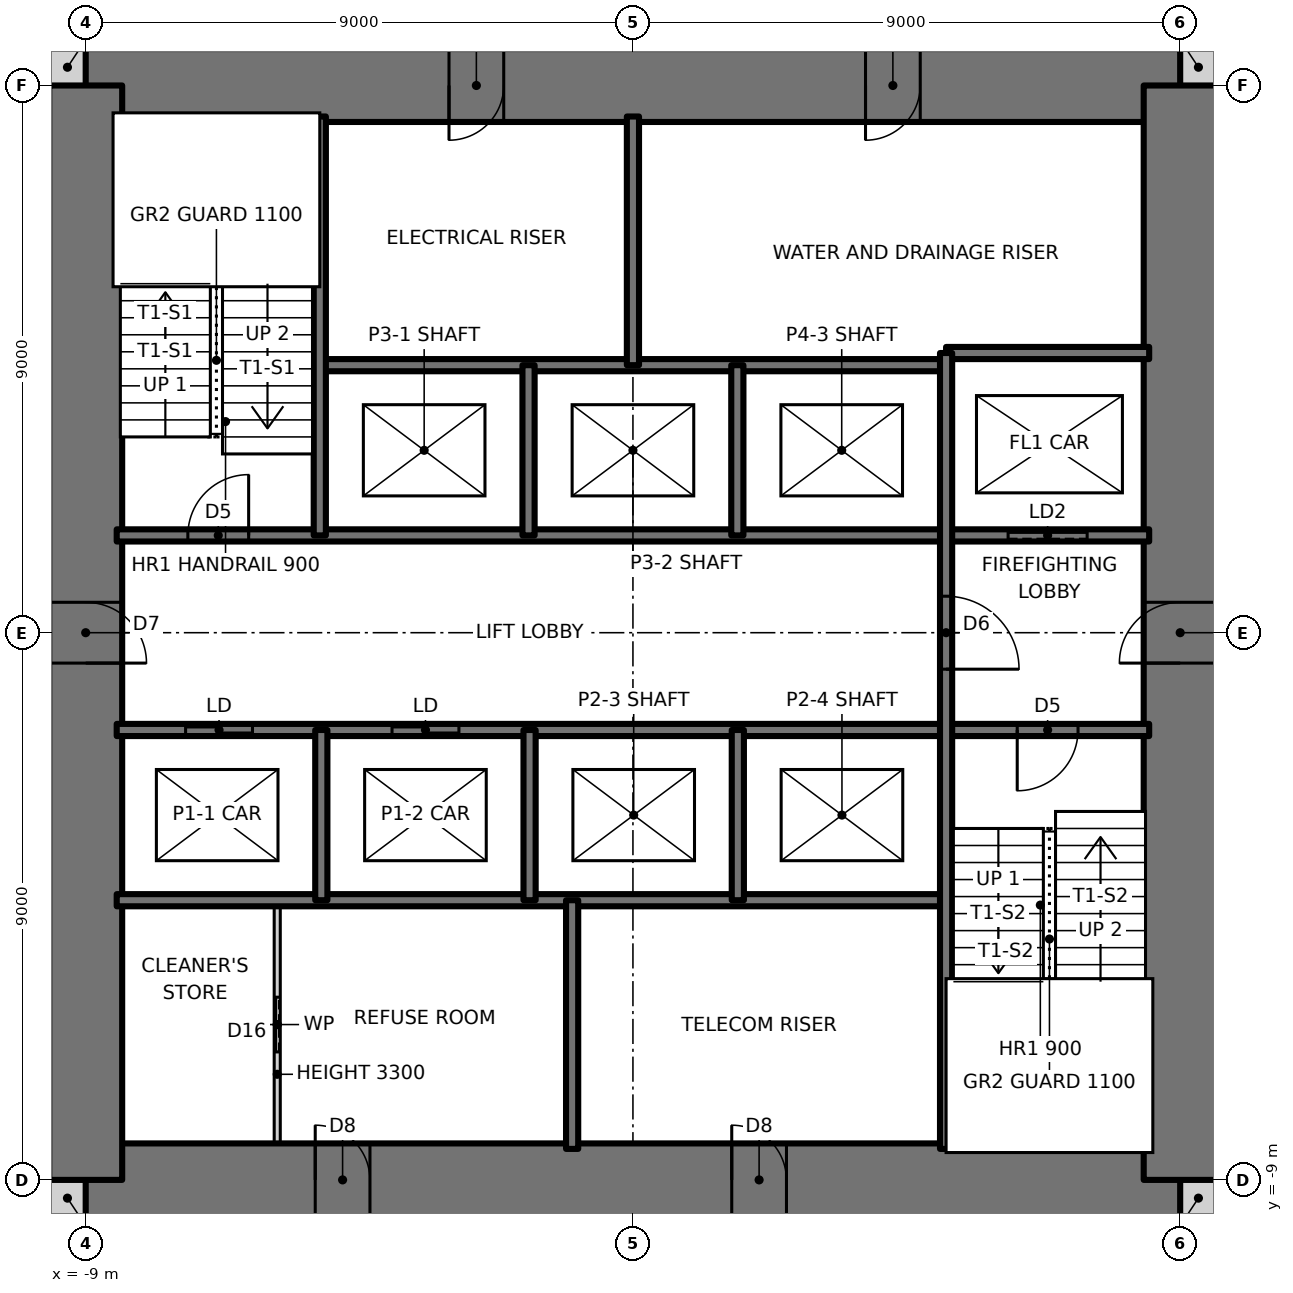
"""IFC4 building model, lengths in metres.
Left out: names, types, materials, properties, quantities, classifications, styles, units other than length and angle.
Written with IfcOpenShell. Run it as: python <this file> out.ifc"""

import sys

from ifc_helpers import new_model, si_unit, direction, frame, frame_2d, origin, place, context, subcontext, project, spatial, rectangle, extrude, element, fill, save


model = new_model("IFC4")
c1 = context("Model", 3, precision=1e-05, world=origin(), true_north=direction((0.0, 1.0)))
c2 = subcontext(c1, "Body", "Model", "MODEL_VIEW")
j1 = project(units=[si_unit("LENGTHUNIT", "METRE"), si_unit("PLANEANGLEUNIT", "RADIAN")], contexts=[c1])
p1 = place(None, origin())
s1 = spatial("IfcSite", under=j1, at=p1, CompositionType="ELEMENT")
p2 = place(p1, origin())
s2 = spatial("IfcBuilding", under=s1, at=p2, CompositionType="ELEMENT")
p3 = place(p2, frame((0.0, 0.0, 32.5)))
s3 = spatial("IfcBuildingStorey", under=s2, at=p3, CompositionType="ELEMENT", Elevation=32.5)
for number, where, z_axis, x_axis in (
    (1, (-9.6, -9.3, 0.0), (0.0, 0.0, 1.0), (1.0, 0.0, 0.0)),
    (2, (9.0, -9.3, 0.0), (0.0, 0.0, 1.0), (1.0, 0.0, 0.0)),
    (3, (9.0, 9.3, 0.0), (0.0, 0.0, 1.0), (1.0, 0.0, 0.0)),
    (4, (-9.6, 9.3, 0.0), (0.0, 0.0, 1.0), (1.0, 0.0, 0.0)),
):
    element("IfcWall", number, at=place(p3, frame(where, z_axis=z_axis, x_axis=x_axis)), inside=s3, PredefinedType="SOLIDWALL", context=c2, shape_type="SweptSolid", body=[
        extrude(rectangle(XDim=0.6, YDim=0.6, at=frame_2d((0.3, 0.0))), origin(), (0.0, 0.0, 1.0), 3.5),
    ])
p4 = place(p3, frame((-9.0, -9.0, 0.0), z_axis=(0.0, 0.0, 1.0), x_axis=(1.0, 0.0, 0.0)))
e5 = element("IfcWall", 5, at=p4, inside=s3, PredefinedType="SHEAR", context=c2, shape_type="SweptSolid", body=[
    extrude(rectangle(XDim=18.0, YDim=1.2, at=frame_2d((9.0, 0.0))), origin(), (0.0, 0.0, 1.0), 3.5),
])
p5 = place(p4, frame((3.775, 0.0, 0.0)))
e6 = element("IfcOpeningElement", 6, at=p5, cuts=e5, PredefinedType="OPENING", context=c2, shape_type="SweptSolid", body=[
    extrude(rectangle(XDim=0.9, YDim=2.1, at=frame_2d((0.45, 1.05))), frame((0.0, 0.61, 0.0), z_axis=(0.0, -1.0, 0.0), x_axis=(1.0, 0.0, 0.0)), (0.0, 0.0, 1.0), 1.22),
])
p6 = place(p4, frame((10.625, 0.0, 0.0)))
e7 = element("IfcOpeningElement", 7, at=p6, cuts=e5, PredefinedType="OPENING", context=c2, shape_type="SweptSolid", body=[
    extrude(rectangle(XDim=0.9, YDim=2.1, at=frame_2d((0.45, 1.05))), frame((0.0, 0.61, 0.0), z_axis=(0.0, -1.0, 0.0), x_axis=(1.0, 0.0, 0.0)), (0.0, 0.0, 1.0), 1.22),
])
p7 = place(p3, frame((9.0, 9.0, 0.0), z_axis=(0.0, 0.0, 1.0), x_axis=(-1.0, 0.0, 0.0)))
e8 = element("IfcWall", 8, at=p7, inside=s3, PredefinedType="SHEAR", context=c2, shape_type="SweptSolid", body=[
    extrude(rectangle(XDim=18.0, YDim=1.2, at=frame_2d((9.0, 0.0))), origin(), (0.0, 0.0, 1.0), 3.5),
])
p8 = place(p7, frame((11.125, 0.0, 0.0)))
e9 = element("IfcOpeningElement", 9, at=p8, cuts=e8, PredefinedType="OPENING", context=c2, shape_type="SweptSolid", body=[
    extrude(rectangle(XDim=0.9, YDim=2.1, at=frame_2d((0.45, 1.05))), frame((0.0, 0.61, 0.0), z_axis=(0.0, -1.0, 0.0), x_axis=(1.0, 0.0, 0.0)), (0.0, 0.0, 1.0), 1.22),
])
p9 = place(p7, frame((4.275, 0.0, 0.0)))
e10 = element("IfcOpeningElement", 10, at=p9, cuts=e8, PredefinedType="OPENING", context=c2, shape_type="SweptSolid", body=[
    extrude(rectangle(XDim=0.9, YDim=2.1, at=frame_2d((0.45, 1.05))), frame((0.0, 0.61, 0.0), z_axis=(0.0, -1.0, 0.0), x_axis=(1.0, 0.0, 0.0)), (0.0, 0.0, 1.0), 1.22),
])
p10 = place(p3, frame((9.0, -9.0, 0.0), z_axis=(0.0, 0.0, 1.0), x_axis=(0.0, 1.0, 0.0)))
e11 = element("IfcWall", 11, at=p10, inside=s3, PredefinedType="SHEAR", context=c2, shape_type="SweptSolid", body=[
    extrude(rectangle(XDim=18.0, YDim=1.2, at=frame_2d((9.0, 0.0))), origin(), (0.0, 0.0, 1.0), 3.5),
])
p11 = place(p10, frame((8.5, 0.0, 0.0)))
e12 = element("IfcOpeningElement", 12, at=p11, cuts=e11, PredefinedType="OPENING", context=c2, shape_type="SweptSolid", body=[
    extrude(rectangle(XDim=1.0, YDim=2.1, at=frame_2d((0.5, 1.05))), frame((0.0, 0.61, 0.0), z_axis=(0.0, -1.0, 0.0), x_axis=(1.0, 0.0, 0.0)), (0.0, 0.0, 1.0), 1.22),
])
p12 = place(p3, frame((-9.0, 9.0, 0.0), z_axis=(0.0, 0.0, 1.0), x_axis=(0.0, -1.0, 0.0)))
e13 = element("IfcWall", 13, at=p12, inside=s3, PredefinedType="SHEAR", context=c2, shape_type="SweptSolid", body=[
    extrude(rectangle(XDim=18.0, YDim=1.2, at=frame_2d((9.0, 0.0))), origin(), (0.0, 0.0, 1.0), 3.5),
])
p13 = place(p12, frame((8.5, 0.0, 0.0)))
e14 = element("IfcOpeningElement", 14, at=p13, cuts=e13, PredefinedType="OPENING", context=c2, shape_type="SweptSolid", body=[
    extrude(rectangle(XDim=1.0, YDim=2.1, at=frame_2d((0.5, 1.05))), frame((0.0, 0.61, 0.0), z_axis=(0.0, -1.0, 0.0), x_axis=(1.0, 0.0, 0.0)), (0.0, 0.0, 1.0), 1.22),
])
p14 = place(p3, frame((-8.49, -4.4, 0.0), z_axis=(0.0, 0.0, 1.0), x_axis=(1.0, 0.0, 0.0)))
e15 = element("IfcWall", 15, at=p14, inside=s3, PredefinedType="SOLIDWALL", context=c2, shape_type="SweptSolid", body=[
    extrude(rectangle(XDim=13.64, YDim=0.2, at=frame_2d((6.82, 0.0))), origin(), (0.0, 0.0, 1.0), 3.5),
])
p15 = place(p3, frame((-8.49, -1.6, 0.0), z_axis=(0.0, 0.0, 1.0), x_axis=(1.0, 0.0, 0.0)))
e16 = element("IfcWall", 16, at=p15, inside=s3, PredefinedType="SOLIDWALL", context=c2, shape_type="SweptSolid", body=[
    extrude(rectangle(XDim=16.98, YDim=0.2, at=frame_2d((8.49, 0.0))), origin(), (0.0, 0.0, 1.0), 3.5),
])
p16 = place(p15, frame((14.81, 0.0, 0.0)))
e17 = element("IfcOpeningElement", 17, at=p16, cuts=e16, PredefinedType="OPENING", context=c2, shape_type="SweptSolid", body=[
    extrude(rectangle(XDim=1.0, YDim=2.1, at=frame_2d((0.5, 1.05))), frame((0.0, 0.11, 0.0), z_axis=(0.0, -1.0, 0.0), x_axis=(1.0, 0.0, 0.0)), (0.0, 0.0, 1.0), 0.22),
])
p17 = place(p15, frame((1.133, 0.0, 0.0)))
e18 = element("IfcOpeningElement", 18, at=p17, cuts=e16, PredefinedType="OPENING", context=c2, shape_type="SweptSolid", body=[
    extrude(rectangle(XDim=1.1, YDim=2.1, at=frame_2d((0.55, 1.05))), frame((0.0, 0.11, 0.0), z_axis=(0.0, -1.0, 0.0), x_axis=(1.0, 0.0, 0.0)), (0.0, 0.0, 1.0), 0.22),
])
p18 = place(p15, frame((4.528, 0.0, 0.0)))
e19 = element("IfcOpeningElement", 19, at=p18, cuts=e16, PredefinedType="OPENING", context=c2, shape_type="SweptSolid", body=[
    extrude(rectangle(XDim=1.1, YDim=2.1, at=frame_2d((0.55, 1.05))), frame((0.0, 0.11, 0.0), z_axis=(0.0, -1.0, 0.0), x_axis=(1.0, 0.0, 0.0)), (0.0, 0.0, 1.0), 0.22),
])
p19 = place(p3, frame((-8.49, 1.6, 0.0), z_axis=(0.0, 0.0, 1.0), x_axis=(1.0, 0.0, 0.0)))
e20 = element("IfcWall", 20, at=p19, inside=s3, PredefinedType="SOLIDWALL", context=c2, shape_type="SweptSolid", body=[
    extrude(rectangle(XDim=16.98, YDim=0.2, at=frame_2d((8.49, 0.0))), origin(), (0.0, 0.0, 1.0), 3.5),
])
p20 = place(p19, frame((1.17, 0.0, 0.0)))
e21 = element("IfcOpeningElement", 21, at=p20, cuts=e20, PredefinedType="OPENING", context=c2, shape_type="SweptSolid", body=[
    extrude(rectangle(XDim=1.0, YDim=2.1, at=frame_2d((0.5, 1.05))), frame((0.0, 0.11, 0.0), z_axis=(0.0, -1.0, 0.0), x_axis=(1.0, 0.0, 0.0)), (0.0, 0.0, 1.0), 0.22),
])
p21 = place(p19, frame((14.66, 0.0, 0.0)))
e22 = element("IfcOpeningElement", 22, at=p21, cuts=e20, PredefinedType="OPENING", context=c2, shape_type="SweptSolid", body=[
    extrude(rectangle(XDim=1.3, YDim=2.1, at=frame_2d((0.65, 1.05))), frame((0.0, 0.11, 0.0), z_axis=(0.0, -1.0, 0.0), x_axis=(1.0, 0.0, 0.0)), (0.0, 0.0, 1.0), 0.22),
])
p22 = place(p3, frame((-5.15, 4.4, 0.0), z_axis=(0.0, 0.0, 1.0), x_axis=(1.0, 0.0, 0.0)))
e23 = element("IfcWall", 23, at=p22, inside=s3, PredefinedType="SOLIDWALL", context=c2, shape_type="SweptSolid", body=[
    extrude(rectangle(XDim=10.3, YDim=0.2, at=frame_2d((5.15, 0.0))), origin(), (0.0, 0.0, 1.0), 3.5),
])
p23 = place(p3, frame((5.15, 4.6, 0.0), z_axis=(0.0, 0.0, 1.0), x_axis=(1.0, 0.0, 0.0)))
e24 = element("IfcWall", 24, at=p23, inside=s3, PredefinedType="SOLIDWALL", context=c2, shape_type="SweptSolid", body=[
    extrude(rectangle(XDim=3.34, YDim=0.2, at=frame_2d((1.67, 0.0))), origin(), (0.0, 0.0, 1.0), 3.5),
])
p24 = place(p3, frame((5.15, -8.49, 0.0), z_axis=(0.0, 0.0, 1.0), x_axis=(0.0, 1.0, 0.0)))
e25 = element("IfcWall", 25, at=p24, inside=s3, PredefinedType="SOLIDWALL", context=c2, shape_type="SweptSolid", body=[
    extrude(rectangle(XDim=13.09, YDim=0.2, at=frame_2d((6.545, 0.0))), origin(), (0.0, 0.0, 1.0), 3.5),
])
p25 = place(p24, frame((7.89, 0.0, 0.0)))
e26 = element("IfcOpeningElement", 26, at=p25, cuts=e25, PredefinedType="OPENING", context=c2, shape_type="SweptSolid", body=[
    extrude(rectangle(XDim=1.2, YDim=2.1, at=frame_2d((0.6, 1.05))), frame((0.0, 0.11, 0.0), z_axis=(0.0, -1.0, 0.0), x_axis=(1.0, 0.0, 0.0)), (0.0, 0.0, 1.0), 0.22),
])
for number, where, z_axis, x_axis in (
    (27, (1.725, -4.4, 0.0), (0.0, 0.0, 1.0), (0.0, 1.0, 0.0)),
    (28, (1.717, 1.6, 0.0), (0.0, 0.0, 1.0), (0.0, 1.0, 0.0)),
):
    element("IfcWall", number, at=place(p3, frame(where, z_axis=z_axis, x_axis=x_axis)), inside=s3, PredefinedType="SOLIDWALL", context=c2, shape_type="SweptSolid", body=[
        extrude(rectangle(XDim=2.8, YDim=0.2, at=frame_2d((1.4, 0.0))), origin(), (0.0, 0.0, 1.0), 3.5),
    ])
for number, where, z_axis, x_axis in (
    (29, (0.0, 4.4, 0.0), (0.0, 0.0, 1.0), (0.0, 1.0, 0.0)),
    (30, (-1.0, -8.49, 0.0), (0.0, 0.0, 1.0), (0.0, 1.0, 0.0)),
):
    element("IfcWall", number, at=place(p3, frame(where, z_axis=z_axis, x_axis=x_axis)), inside=s3, PredefinedType="SOLIDWALL", context=c2, shape_type="SweptSolid", body=[
        extrude(rectangle(XDim=4.09, YDim=0.2, at=frame_2d((2.045, 0.0))), origin(), (0.0, 0.0, 1.0), 3.5),
    ])
for number, where, z_axis, x_axis in (
    (31, (-1.7, -4.4, 0.0), (0.0, 0.0, 1.0), (0.0, 1.0, 0.0)),
    (32, (-1.717, 1.6, 0.0), (0.0, 0.0, 1.0), (0.0, 1.0, 0.0)),
    (33, (-5.125, -4.4, 0.0), (0.0, 0.0, 1.0), (0.0, 1.0, 0.0)),
):
    element("IfcWall", number, at=place(p3, frame(where, z_axis=z_axis, x_axis=x_axis)), inside=s3, PredefinedType="SOLIDWALL", context=c2, shape_type="SweptSolid", body=[
        extrude(rectangle(XDim=2.8, YDim=0.2, at=frame_2d((1.4, 0.0))), origin(), (0.0, 0.0, 1.0), 3.5),
    ])
p26 = place(p3, frame((-5.15, 1.6, 0.0), z_axis=(0.0, 0.0, 1.0), x_axis=(0.0, 1.0, 0.0)))
e34 = element("IfcWall", 34, at=p26, inside=s3, PredefinedType="SOLIDWALL", context=c2, shape_type="SweptSolid", body=[
    extrude(rectangle(XDim=6.89, YDim=0.2, at=frame_2d((3.445, 0.0))), origin(), (0.0, 0.0, 1.0), 3.5),
])
p27 = place(p3, frame((-5.85, -8.49, 0.0), z_axis=(0.0, 0.0, 1.0), x_axis=(0.0, 1.0, 0.0)))
e35 = element("IfcWall", 35, at=p27, inside=s3, PredefinedType="PARTITIONING", context=c2, shape_type="SweptSolid", body=[
    extrude(rectangle(XDim=4.09, YDim=0.1, at=frame_2d((2.045, 0.0))), origin(), (0.0, 0.0, 1.0), 3.3),
])
p28 = place(p27, frame((1.595, 0.0, 0.0)))
e36 = element("IfcOpeningElement", 36, at=p28, cuts=e35, PredefinedType="OPENING", context=c2, shape_type="SweptSolid", body=[
    extrude(rectangle(XDim=0.9, YDim=2.1, at=frame_2d((0.45, 1.05))), frame((0.0, 0.06, 0.0), z_axis=(0.0, -1.0, 0.0), x_axis=(1.0, 0.0, 0.0)), (0.0, 0.0, 1.0), 0.12),
])
p29 = place(p20, origin())
e37 = element("IfcDoor", 37, at=p29, inside=s3, OperationType="SINGLE_SWING_RIGHT", PredefinedType="DOOR", context=c2, shape_type="SweptSolid", body=[
    extrude(rectangle(XDim=1.0, YDim=2.1, at=frame_2d((0.5, 1.05))), frame((0.0, 0.025, 0.0), z_axis=(0.0, -1.0, 0.0), x_axis=(1.0, 0.0, 0.0)), (0.0, 0.0, 1.0), 0.05),
])
fill(e21, e37)
p30 = place(p16, frame((1.0, 0.0, 0.0), z_axis=(0.0, 0.0, 1.0), x_axis=(-1.0, 0.0, 0.0)))
e38 = element("IfcDoor", 38, at=p30, inside=s3, OperationType="SINGLE_SWING_RIGHT", PredefinedType="DOOR", context=c2, shape_type="SweptSolid", body=[
    extrude(rectangle(XDim=1.0, YDim=2.1, at=frame_2d((0.5, 1.05))), frame((0.0, 0.025, 0.0), z_axis=(0.0, -1.0, 0.0), x_axis=(1.0, 0.0, 0.0)), (0.0, 0.0, 1.0), 0.05),
])
fill(e17, e38)
p31 = place(p25, frame((1.2, 0.0, 0.0), z_axis=(0.0, 0.0, 1.0), x_axis=(-1.0, 0.0, 0.0)))
e39 = element("IfcDoor", 39, at=p31, inside=s3, OperationType="SINGLE_SWING_RIGHT", PredefinedType="DOOR", context=c2, shape_type="SweptSolid", body=[
    extrude(rectangle(XDim=1.2, YDim=2.1, at=frame_2d((0.6, 1.05))), frame((0.0, 0.025, 0.0), z_axis=(0.0, -1.0, 0.0), x_axis=(1.0, 0.0, 0.0)), (0.0, 0.0, 1.0), 0.05),
])
fill(e26, e39)
p32 = place(p28, origin())
e40 = element("IfcDoor", 40, at=p32, inside=s3, OperationType="SLIDING_TO_LEFT", PredefinedType="DOOR", context=c2, shape_type="SweptSolid", body=[
    extrude(rectangle(XDim=0.9, YDim=2.1, at=frame_2d((0.45, 1.05))), frame((0.0, 0.025, 0.0), z_axis=(0.0, -1.0, 0.0), x_axis=(1.0, 0.0, 0.0)), (0.0, 0.0, 1.0), 0.05),
])
fill(e36, e40)
p33 = place(p13, origin())
e41 = element("IfcDoor", 41, at=p33, inside=s3, OperationType="SINGLE_SWING_RIGHT", PredefinedType="DOOR", context=c2, shape_type="SweptSolid", body=[
    extrude(rectangle(XDim=1.0, YDim=2.1, at=frame_2d((0.5, 1.05))), frame((0.0, 0.025, 0.0), z_axis=(0.0, -1.0, 0.0), x_axis=(1.0, 0.0, 0.0)), (0.0, 0.0, 1.0), 0.05),
])
fill(e14, e41)
p34 = place(p11, origin())
e42 = element("IfcDoor", 42, at=p34, inside=s3, OperationType="SINGLE_SWING_LEFT", PredefinedType="DOOR", context=c2, shape_type="SweptSolid", body=[
    extrude(rectangle(XDim=1.0, YDim=2.1, at=frame_2d((0.5, 1.05))), frame((0.0, 0.025, 0.0), z_axis=(0.0, -1.0, 0.0), x_axis=(1.0, 0.0, 0.0)), (0.0, 0.0, 1.0), 0.05),
])
fill(e12, e42)
p35 = place(p8, origin())
e43 = element("IfcDoor", 43, at=p35, inside=s3, OperationType="SINGLE_SWING_RIGHT", PredefinedType="DOOR", context=c2, shape_type="SweptSolid", body=[
    extrude(rectangle(XDim=0.9, YDim=2.1, at=frame_2d((0.45, 1.05))), frame((0.0, 0.025, 0.0), z_axis=(0.0, -1.0, 0.0), x_axis=(1.0, 0.0, 0.0)), (0.0, 0.0, 1.0), 0.05),
])
fill(e9, e43)
p36 = place(p9, origin())
e44 = element("IfcDoor", 44, at=p36, inside=s3, OperationType="SINGLE_SWING_RIGHT", PredefinedType="DOOR", context=c2, shape_type="SweptSolid", body=[
    extrude(rectangle(XDim=0.9, YDim=2.1, at=frame_2d((0.45, 1.05))), frame((0.0, 0.025, 0.0), z_axis=(0.0, -1.0, 0.0), x_axis=(1.0, 0.0, 0.0)), (0.0, 0.0, 1.0), 0.05),
])
fill(e10, e44)
p37 = place(p5, origin())
e45 = element("IfcDoor", 45, at=p37, inside=s3, OperationType="SINGLE_SWING_LEFT", PredefinedType="DOOR", context=c2, shape_type="SweptSolid", body=[
    extrude(rectangle(XDim=0.9, YDim=2.1, at=frame_2d((0.45, 1.05))), frame((0.0, 0.025, 0.0), z_axis=(0.0, -1.0, 0.0), x_axis=(1.0, 0.0, 0.0)), (0.0, 0.0, 1.0), 0.05),
])
fill(e6, e45)
p38 = place(p6, origin())
e46 = element("IfcDoor", 46, at=p38, inside=s3, OperationType="SINGLE_SWING_LEFT", PredefinedType="DOOR", context=c2, shape_type="SweptSolid", body=[
    extrude(rectangle(XDim=0.9, YDim=2.1, at=frame_2d((0.45, 1.05))), frame((0.0, 0.025, 0.0), z_axis=(0.0, -1.0, 0.0), x_axis=(1.0, 0.0, 0.0)), (0.0, 0.0, 1.0), 0.05),
])
fill(e7, e46)
p39 = place(p17, origin())
e47 = element("IfcDoor", 47, at=p39, inside=s3, OperationType="DOUBLE_DOOR_SLIDING", PredefinedType="DOOR", context=c2, shape_type="SweptSolid", body=[
    extrude(rectangle(XDim=1.1, YDim=2.1, at=frame_2d((0.55, 1.05))), frame((0.0, 0.025, 0.0), z_axis=(0.0, -1.0, 0.0), x_axis=(1.0, 0.0, 0.0)), (0.0, 0.0, 1.0), 0.05),
])
fill(e18, e47)
p40 = place(p18, origin())
e48 = element("IfcDoor", 48, at=p40, inside=s3, OperationType="DOUBLE_DOOR_SLIDING", PredefinedType="DOOR", context=c2, shape_type="SweptSolid", body=[
    extrude(rectangle(XDim=1.1, YDim=2.1, at=frame_2d((0.55, 1.05))), frame((0.0, 0.025, 0.0), z_axis=(0.0, -1.0, 0.0), x_axis=(1.0, 0.0, 0.0)), (0.0, 0.0, 1.0), 0.05),
])
fill(e19, e48)
p41 = place(p21, origin())
e49 = element("IfcDoor", 49, at=p41, inside=s3, OperationType="SLIDING_TO_LEFT", PredefinedType="DOOR", context=c2, shape_type="SweptSolid", body=[
    extrude(rectangle(XDim=1.3, YDim=2.1, at=frame_2d((0.65, 1.05))), frame((0.0, 0.025, 0.0), z_axis=(0.0, -1.0, 0.0), x_axis=(1.0, 0.0, 0.0)), (0.0, 0.0, 1.0), 0.05),
])
fill(e22, e49)
save(model, sys.argv[1])
